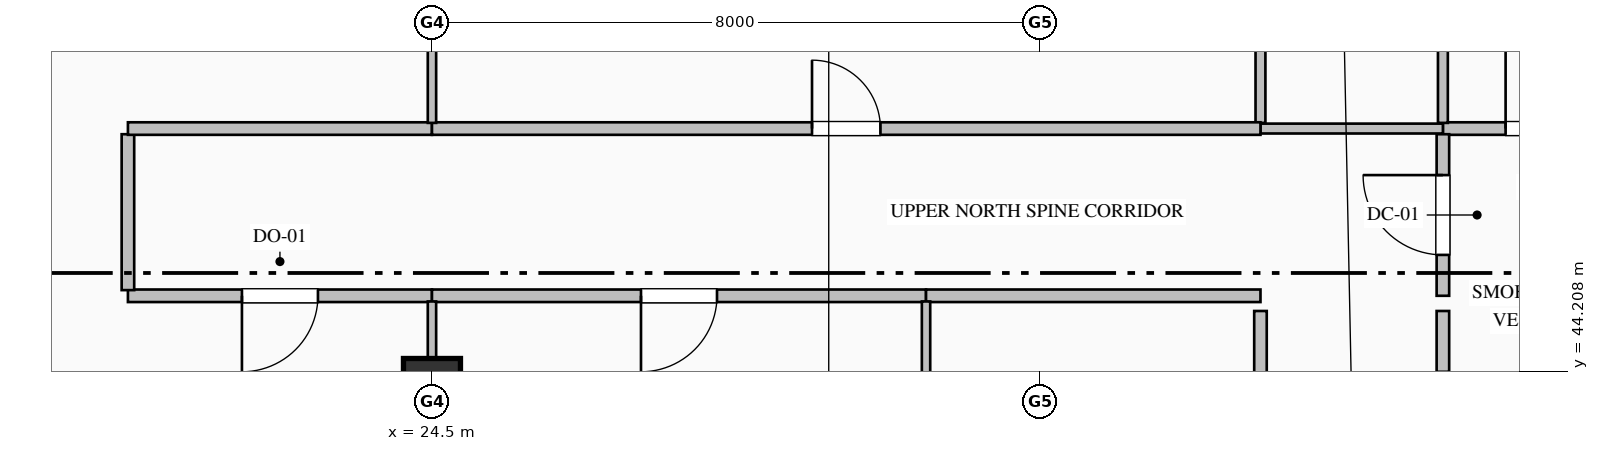
"""IFC4 building model, lengths in metres.
Left out: names, types, materials, properties, quantities, classifications, styles, units other than length and angle.
Written with IfcOpenShell. Run it as: python <this file> out.ifc"""

import sys

from ifc_helpers import new_model, si_unit, direction, frame, frame_2d, origin, origin_2d, place, context, subcontext, project, spatial, rectangle, extrude, element, fill, save


model = new_model("IFC4")
c1 = context("Model", 3, precision=1e-05, world=origin(), true_north=direction((0.0, 1.0)))
c2 = subcontext(c1, "Body", "Model", "MODEL_VIEW")
j1 = project(units=[si_unit("LENGTHUNIT", "METRE"), si_unit("PLANEANGLEUNIT", "RADIAN")], contexts=[c1])
p1 = place(None, origin())
s1 = spatial("IfcSite", under=j1, at=p1, CompositionType="ELEMENT")
p2 = place(p1, origin())
s2 = spatial("IfcBuilding", under=s1, at=p2, CompositionType="ELEMENT")
p3 = place(p2, frame((0.0, 0.0, 319.2)))
s3 = spatial("IfcBuildingStorey", under=s2, at=p3, CompositionType="ELEMENT", Elevation=319.2)
p4 = place(p3, frame((24.5, 44.0, 0.0), z_axis=(0.0, 0.0, 1.0), x_axis=(1.0, 0.0, 0.0)))
e1 = element("IfcColumn", 1, at=p4, inside=s3, PredefinedType="COLUMN", context=c2, shape_type="SweptSolid", body=[
    extrude(rectangle(XDim=0.75, YDim=0.75, at=origin_2d()), origin(), (0.0, 0.0, 1.0), 4.0),
])
p5 = place(p3, frame((16.627, 47.873, 0.0), z_axis=(0.0, 0.0, 1.0), x_axis=(0.707106781187, 0.707106781187, 0.0)))
e2 = element("IfcWall", 2, at=p5, inside=s3, PredefinedType="SOLIDWALL", context=c2, shape_type="SweptSolid", body=[
    extrude(rectangle(XDim=5.657, YDim=0.36, at=frame_2d((2.828, 0.0))), origin(), (0.0, 0.0, 1.0), 3.785),
])
p6 = place(p3, frame((37.8, 47.4, 0.0), z_axis=(0.0, 0.0, 1.0), x_axis=(1.0, 0.0, 0.0)))
e3 = element("IfcWall", 3, at=p6, inside=s3, PredefinedType="PARTITIONING", context=c2, shape_type="SweptSolid", body=[
    extrude(rectangle(XDim=2.7, YDim=0.165, at=frame_2d((1.35, 0.0))), origin(), (0.0, 0.0, 1.0), 3.785),
])
p7 = place(p6, frame((0.825, 0.0, 0.0)))
e4 = element("IfcOpeningElement", 4, at=p7, cuts=e3, PredefinedType="OPENING", context=c2, shape_type="SweptSolid", body=[
    extrude(rectangle(XDim=1.05, YDim=2.15, at=frame_2d((0.525, 1.075))), frame((0.0, 0.093, 0.0), z_axis=(0.0, -1.0, 0.0), x_axis=(1.0, 0.0, 0.0)), (0.0, 0.0, 1.0), 0.185),
])
p8 = place(p3, frame((37.8, 45.2, 0.0), z_axis=(0.0, 0.0, 1.0), x_axis=(0.0, 1.0, 0.0)))
e5 = element("IfcWall", 5, at=p8, inside=s3, PredefinedType="PARTITIONING", context=c2, shape_type="SweptSolid", body=[
    extrude(rectangle(XDim=2.125, YDim=0.165, at=frame_2d((1.063, 0.0))), origin(), (0.0, 0.0, 1.0), 3.785),
])
p9 = place(p8, frame((0.538, 0.0, 0.0)))
e6 = element("IfcOpeningElement", 6, at=p9, cuts=e5, PredefinedType="OPENING", context=c2, shape_type="SweptSolid", body=[
    extrude(rectangle(XDim=1.05, YDim=2.15, at=frame_2d((0.525, 1.075))), frame((0.0, 0.093, 0.0), z_axis=(0.0, -1.0, 0.0), x_axis=(1.0, 0.0, 0.0)), (0.0, 0.0, 1.0), 0.185),
])
p10 = place(p3, frame((37.8, 44.2, 0.0), z_axis=(0.0, 0.0, 1.0), x_axis=(0.0, 1.0, 0.0)))
e7 = element("IfcWall", 7, at=p10, inside=s3, PredefinedType="PARTITIONING", context=c2, shape_type="SweptSolid", body=[
    extrude(rectangle(XDim=0.8, YDim=0.165, at=frame_2d((0.4, 0.0))), origin(), (0.0, 0.0, 1.0), 3.785),
])
p11 = place(p3, frame((37.8, 47.475, 0.0), z_axis=(0.0, 0.0, 1.0), x_axis=(0.0, 1.0, 0.0)))
e8 = element("IfcWall", 8, at=p11, inside=s3, PredefinedType="PARTITIONING", context=c2, shape_type="SweptSolid", body=[
    extrude(rectangle(XDim=4.173, YDim=0.13, at=frame_2d((2.087, 0.0))), origin(), (0.0, 0.0, 1.0), 3.785),
])
p12 = place(p11, frame((1.577, 0.0, 0.0)))
e9 = element("IfcOpeningElement", 9, at=p12, cuts=e8, PredefinedType="OPENING", context=c2, shape_type="SweptSolid", body=[
    extrude(rectangle(XDim=1.02, YDim=2.15, at=frame_2d((0.51, 1.075))), frame((0.0, 0.075, 0.0), z_axis=(0.0, -1.0, 0.0), x_axis=(1.0, 0.0, 0.0)), (0.0, 0.0, 1.0), 0.15),
])
p13 = place(p3, frame((37.8, 47.4, 0.0), z_axis=(0.0, 0.0, 1.0), x_axis=(-1.0, 0.0, 0.0)))
e10 = element("IfcWall", 10, at=p13, inside=s3, PredefinedType="PARTITIONING", context=c2, shape_type="SweptSolid", body=[
    extrude(rectangle(XDim=2.4, YDim=0.13, at=frame_2d((1.2, 0.0))), origin(), (0.0, 0.0, 1.0), 3.785),
])
p14 = place(p3, frame((35.4, 47.475, 0.0), z_axis=(0.0, 0.0, 1.0), x_axis=(0.0, 1.0, 0.0)))
e11 = element("IfcWall", 11, at=p14, inside=s3, PredefinedType="PARTITIONING", context=c2, shape_type="SweptSolid", body=[
    extrude(rectangle(XDim=4.173, YDim=0.13, at=frame_2d((2.087, 0.0))), origin(), (0.0, 0.0, 1.0), 3.785),
])
p15 = place(p3, frame((24.5, 45.2, 0.0), z_axis=(0.0, 0.0, 1.0), x_axis=(-1.0, 0.0, 0.0)))
e12 = element("IfcWall", 12, at=p15, inside=s3, PredefinedType="PARTITIONING", context=c2, shape_type="SweptSolid", body=[
    extrude(rectangle(XDim=4.0, YDim=0.165, at=frame_2d((2.0, 0.0))), origin(), (0.0, 0.0, 1.0), 3.785),
])
p16 = place(p15, frame((1.5, 0.0, 0.0)))
e13 = element("IfcOpeningElement", 13, at=p16, cuts=e12, PredefinedType="OPENING", context=c2, shape_type="SweptSolid", body=[
    extrude(rectangle(XDim=1.0, YDim=2.15, at=frame_2d((0.5, 1.075))), frame((0.0, 0.093, 0.0), z_axis=(0.0, -1.0, 0.0), x_axis=(1.0, 0.0, 0.0)), (0.0, 0.0, 1.0), 0.185),
])
p17 = place(p3, frame((20.5, 45.274, 0.0), z_axis=(0.0, 0.0, 1.0), x_axis=(0.0, 1.0, 0.0)))
e14 = element("IfcWall", 14, at=p17, inside=s3, PredefinedType="PARTITIONING", context=c2, shape_type="SweptSolid", body=[
    extrude(rectangle(XDim=2.051, YDim=0.165, at=frame_2d((1.025, 0.0))), origin(), (0.0, 0.0, 1.0), 3.785),
])
p18 = place(p3, frame((20.5, 47.4, 0.0), z_axis=(0.0, 0.0, 1.0), x_axis=(1.0, 0.0, 0.0)))
e15 = element("IfcWall", 15, at=p18, inside=s3, PredefinedType="PARTITIONING", context=c2, shape_type="SweptSolid", body=[
    extrude(rectangle(XDim=4.0, YDim=0.165, at=frame_2d((2.0, 0.0))), origin(), (0.0, 0.0, 1.0), 3.785),
])
p19 = place(p3, frame((24.5, 47.4, 0.0), z_axis=(0.0, 0.0, 1.0), x_axis=(1.0, 0.0, 0.0)))
e16 = element("IfcWall", 16, at=p19, inside=s3, PredefinedType="PARTITIONING", context=c2, shape_type="SweptSolid", body=[
    extrude(rectangle(XDim=10.9, YDim=0.165, at=frame_2d((5.45, 0.0))), origin(), (0.0, 0.0, 1.0), 3.785),
])
p20 = place(p19, frame((5.0, 0.0, 0.0)))
e17 = element("IfcOpeningElement", 17, at=p20, cuts=e16, PredefinedType="OPENING", context=c2, shape_type="SweptSolid", body=[
    extrude(rectangle(XDim=0.9, YDim=2.15, at=frame_2d((0.45, 1.075))), frame((0.0, 0.093, 0.0), z_axis=(0.0, -1.0, 0.0), x_axis=(1.0, 0.0, 0.0)), (0.0, 0.0, 1.0), 0.185),
])
p21 = place(p3, frame((31.0, 45.2, 0.0), z_axis=(0.0, 0.0, 1.0), x_axis=(-1.0, 0.0, 0.0)))
e18 = element("IfcWall", 18, at=p21, inside=s3, PredefinedType="PARTITIONING", context=c2, shape_type="SweptSolid", body=[
    extrude(rectangle(XDim=6.5, YDim=0.165, at=frame_2d((3.25, 0.0))), origin(), (0.0, 0.0, 1.0), 3.785),
])
p22 = place(p21, frame((2.75, 0.0, 0.0)))
e19 = element("IfcOpeningElement", 19, at=p22, cuts=e18, PredefinedType="OPENING", context=c2, shape_type="SweptSolid", body=[
    extrude(rectangle(XDim=1.0, YDim=2.15, at=frame_2d((0.5, 1.075))), frame((0.0, 0.093, 0.0), z_axis=(0.0, -1.0, 0.0), x_axis=(1.0, 0.0, 0.0)), (0.0, 0.0, 1.0), 0.185),
])
p23 = place(p3, frame((35.4, 45.2, 0.0), z_axis=(0.0, 0.0, 1.0), x_axis=(-1.0, 0.0, 0.0)))
e20 = element("IfcWall", 20, at=p23, inside=s3, PredefinedType="PARTITIONING", context=c2, shape_type="SweptSolid", body=[
    extrude(rectangle(XDim=4.4, YDim=0.165, at=frame_2d((2.2, 0.0))), origin(), (0.0, 0.0, 1.0), 3.785),
])
p24 = place(p3, frame((35.4, 33.6, 0.0), z_axis=(0.0, 0.0, 1.0), x_axis=(0.0, 1.0, 0.0)))
e21 = element("IfcWall", 21, at=p24, inside=s3, PredefinedType="PARTITIONING", context=c2, shape_type="SweptSolid", body=[
    extrude(rectangle(XDim=11.4, YDim=0.165, at=frame_2d((5.7, 0.0))), origin(), (0.0, 0.0, 1.0), 3.785),
])
p25 = place(p24, frame((5.2, 0.0, 0.0)))
e22 = element("IfcOpeningElement", 22, at=p25, cuts=e21, PredefinedType="OPENING", context=c2, shape_type="SweptSolid", body=[
    extrude(rectangle(XDim=1.0, YDim=2.15, at=frame_2d((0.5, 1.075))), frame((0.0, 0.093, 0.0), z_axis=(0.0, -1.0, 0.0), x_axis=(1.0, 0.0, 0.0)), (0.0, 0.0, 1.0), 0.185),
])
p26 = place(p3, frame((24.5, 51.648, 0.0), z_axis=(0.0, 0.0, 1.0), x_axis=(0.0, -1.0, 0.0)))
e23 = element("IfcWall", 23, at=p26, inside=s3, PredefinedType="MOVABLE", context=c2, shape_type="SweptSolid", body=[
    extrude(rectangle(XDim=4.173, YDim=0.11, at=frame_2d((2.087, 0.0))), origin(), (0.0, 0.0, 1.0), 3.177),
])
p27 = place(p3, frame((24.5, 45.125, 0.0), z_axis=(0.0, 0.0, 1.0), x_axis=(0.0, -1.0, 0.0)))
e24 = element("IfcWall", 24, at=p27, inside=s3, PredefinedType="MOVABLE", context=c2, shape_type="SweptSolid", body=[
    extrude(rectangle(XDim=16.773, YDim=0.11, at=frame_2d((8.387, 0.0))), origin(), (0.0, 0.0, 1.0), 3.177),
])
p28 = place(p3, frame((31.0, 45.125, 0.0), z_axis=(0.0, 0.0, 1.0), x_axis=(0.0, -1.0, 0.0)))
e25 = element("IfcWall", 25, at=p28, inside=s3, PredefinedType="MOVABLE", context=c2, shape_type="SweptSolid", body=[
    extrude(rectangle(XDim=16.773, YDim=0.11, at=frame_2d((8.387, 0.0))), origin(), (0.0, 0.0, 1.0), 3.785),
])
p29 = place(p7, origin())
e26 = element("IfcDoor", 26, at=p29, inside=s3, OperationType="SINGLE_SWING_LEFT", PredefinedType="DOOR", context=c2, shape_type="SweptSolid", body=[
    extrude(rectangle(XDim=1.05, YDim=2.15, at=frame_2d((0.525, 1.075))), frame((0.0, 0.025, 0.0), z_axis=(0.0, -1.0, 0.0), x_axis=(1.0, 0.0, 0.0)), (0.0, 0.0, 1.0), 0.05),
])
fill(e4, e26)
p30 = place(p9, origin())
e27 = element("IfcDoor", 27, at=p30, inside=s3, OperationType="SINGLE_SWING_RIGHT", PredefinedType="DOOR", context=c2, shape_type="SweptSolid", body=[
    extrude(rectangle(XDim=1.05, YDim=2.15, at=frame_2d((0.525, 1.075))), frame((0.0, 0.025, 0.0), z_axis=(0.0, -1.0, 0.0), x_axis=(1.0, 0.0, 0.0)), (0.0, 0.0, 1.0), 0.05),
])
fill(e6, e27)
p31 = place(p16, origin())
e28 = element("IfcDoor", 28, at=p31, inside=s3, OperationType="SINGLE_SWING_RIGHT", PredefinedType="DOOR", context=c2, shape_type="SweptSolid", body=[
    extrude(rectangle(XDim=1.0, YDim=2.15, at=frame_2d((0.5, 1.075))), frame((0.0, 0.025, 0.0), z_axis=(0.0, -1.0, 0.0), x_axis=(1.0, 0.0, 0.0)), (0.0, 0.0, 1.0), 0.05),
])
fill(e13, e28)
p32 = place(p20, origin())
e29 = element("IfcDoor", 29, at=p32, inside=s3, OperationType="SINGLE_SWING_LEFT", PredefinedType="DOOR", context=c2, shape_type="SweptSolid", body=[
    extrude(rectangle(XDim=0.9, YDim=2.15, at=frame_2d((0.45, 1.075))), frame((0.0, 0.025, 0.0), z_axis=(0.0, -1.0, 0.0), x_axis=(1.0, 0.0, 0.0)), (0.0, 0.0, 1.0), 0.05),
])
fill(e17, e29)
p33 = place(p22, origin())
e30 = element("IfcDoor", 30, at=p33, inside=s3, OperationType="SINGLE_SWING_RIGHT", PredefinedType="DOOR", context=c2, shape_type="SweptSolid", body=[
    extrude(rectangle(XDim=1.0, YDim=2.15, at=frame_2d((0.5, 1.075))), frame((0.0, 0.025, 0.0), z_axis=(0.0, -1.0, 0.0), x_axis=(1.0, 0.0, 0.0)), (0.0, 0.0, 1.0), 0.05),
])
fill(e19, e30)
save(model, sys.argv[1])
